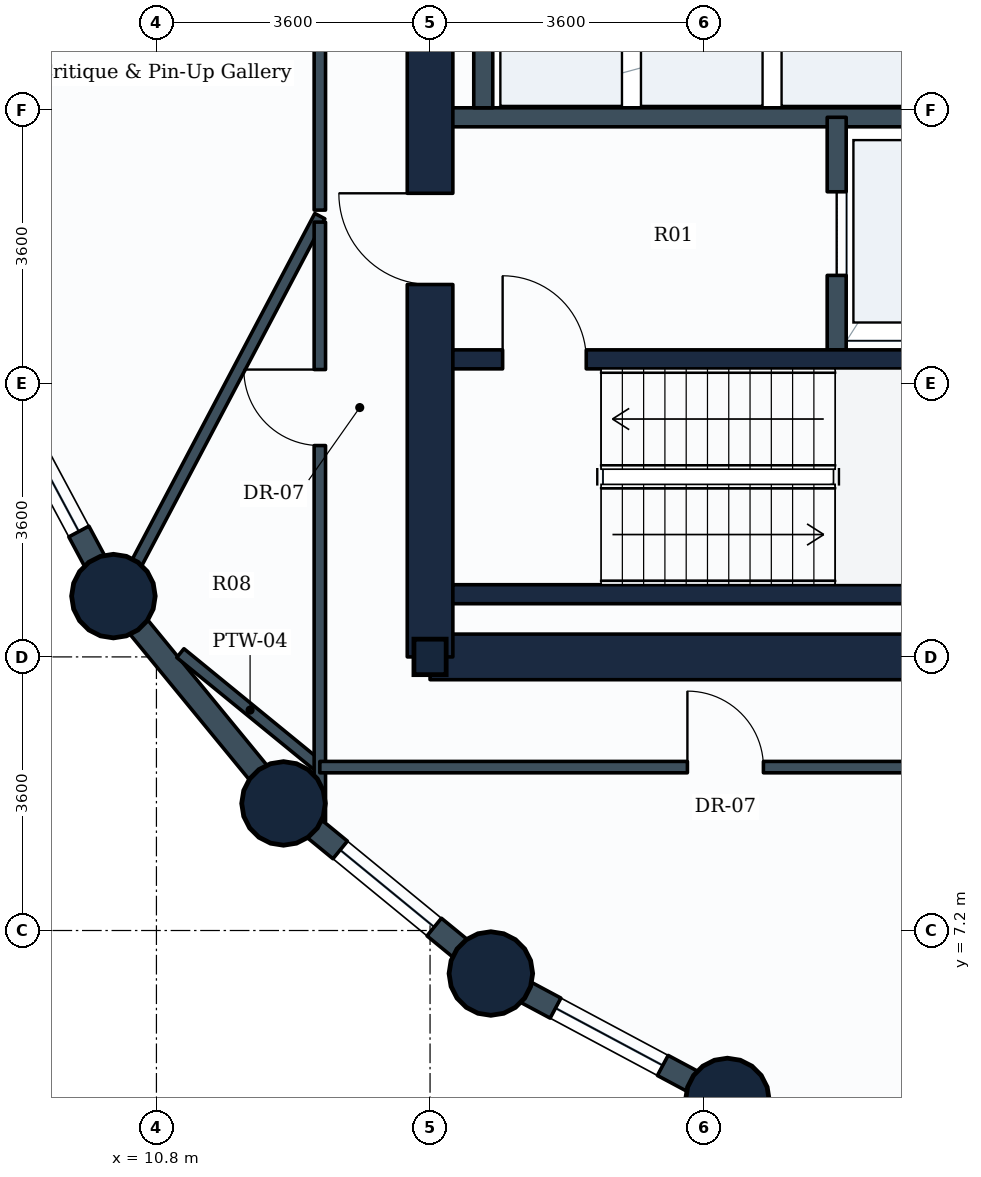
"""IFC4 building model, lengths in metres.
Left out: names, types, materials, properties, quantities, classifications, styles, units other than length and angle.
Written with IfcOpenShell. Run it as: python <this file> out.ifc"""

import sys

from ifc_helpers import new_model, si_unit, direction, frame, frame_2d, origin, origin_2d, place, context, subcontext, project, spatial, rectangle, circle, i_section, extrude, element, fill, save


model = new_model("IFC4")
c1 = context("Model", 3, precision=1e-05, world=origin(), true_north=direction((0.0, 1.0)))
c2 = subcontext(c1, "Body", "Model", "MODEL_VIEW")
j1 = project(units=[si_unit("LENGTHUNIT", "METRE"), si_unit("PLANEANGLEUNIT", "RADIAN")], contexts=[c1])
p1 = place(None, origin())
s1 = spatial("IfcSite", under=j1, at=p1, CompositionType="ELEMENT")
p2 = place(p1, origin())
s2 = spatial("IfcBuilding", under=s1, at=p2, CompositionType="ELEMENT")
p3 = place(p2, frame((0.0, 0.0, 95.7)))
s3 = spatial("IfcBuildingStorey", under=s2, at=p3, CompositionType="ELEMENT", Elevation=95.7)
for number, where, z_axis, x_axis in (
    (1, (10.234, 11.6, 0.0), (0.0, 0.0, 1.0), (1.0, 0.0, 0.0)),
    (2, (12.472, 8.872, 0.0), (0.0, 0.0, 1.0), (1.0, 0.0, 0.0)),
):
    element("IfcColumn", number, at=place(p3, frame(where, z_axis=z_axis, x_axis=x_axis)), inside=s3, PredefinedType="COLUMN", context=c2, shape_type="SweptSolid", body=[
        extrude(circle(Radius=0.55, at=origin_2d()), origin(), (0.0, 0.0, 1.0), 3.9),
    ])
p4 = place(p3, frame((14.4, 10.8, 0.0), z_axis=(0.0, 0.0, 1.0), x_axis=(1.0, 0.0, 0.0)))
e3 = element("IfcColumn", 3, at=p4, inside=s3, PredefinedType="COLUMN", context=c2, shape_type="SweptSolid", body=[
    extrude(i_section(OverallWidth=0.424, OverallDepth=0.467, WebThickness=0.033, FlangeThickness=0.053, FilletRadius=0.015, at=origin_2d()), origin(), (0.0, 0.0, 1.0), 3.9),
])
for number, where, z_axis, x_axis in (
    (4, (15.2, 6.634, 0.0), (0.0, 0.0, 1.0), (1.0, 0.0, 0.0)),
    (5, (18.312, 4.97, 0.0), (0.0, 0.0, 1.0), (1.0, 0.0, 0.0)),
):
    element("IfcColumn", number, at=place(p3, frame(where, z_axis=z_axis, x_axis=x_axis)), inside=s3, PredefinedType="COLUMN", context=c2, shape_type="SweptSolid", body=[
        extrude(circle(Radius=0.55, at=origin_2d()), origin(), (0.0, 0.0, 1.0), 3.9),
    ])
p5 = place(p3, frame((10.234, 11.6, 0.0), z_axis=(0.0, 0.0, 1.0), x_axis=(-0.47151087309, 0.881860247748, 0.0)))
e6 = element("IfcWall", 6, at=p5, inside=s3, PredefinedType="STANDARD", context=c2, shape_type="SweptSolid", body=[
    extrude(rectangle(XDim=3.529, YDim=0.3, at=frame_2d((1.764, 0.0))), origin(), (0.0, 0.0, 1.0), 2.93),
])
p6 = place(p5, frame((0.964, 0.0, 0.85)))
e7 = element("IfcOpeningElement", 7, at=p6, cuts=e6, PredefinedType="OPENING", context=c2, shape_type="SweptSolid", body=[
    extrude(rectangle(XDim=1.6, YDim=1.35, at=frame_2d((0.8, 0.675))), frame((0.0, 0.16, 0.0), z_axis=(0.0, -1.0, 0.0), x_axis=(1.0, 0.0, 0.0)), (0.0, 0.0, 1.0), 0.32),
])
p7 = place(p3, frame((12.472, 8.872, 0.0), z_axis=(0.0, 0.0, 1.0), x_axis=(-0.634258295121, 0.773121216285, 0.0)))
e8 = element("IfcWall", 8, at=p7, inside=s3, PredefinedType="STANDARD", context=c2, shape_type="SweptSolid", body=[
    extrude(rectangle(XDim=3.529, YDim=0.3, at=frame_2d((1.764, 0.0))), origin(), (0.0, 0.0, 1.0), 2.93),
])
p8 = place(p3, frame((15.2, 6.634, 0.0), z_axis=(0.0, 0.0, 1.0), x_axis=(-0.773121216285, 0.634258295121, 0.0)))
e9 = element("IfcWall", 9, at=p8, inside=s3, PredefinedType="STANDARD", context=c2, shape_type="SweptSolid", body=[
    extrude(rectangle(XDim=3.529, YDim=0.3, at=frame_2d((1.764, 0.0))), origin(), (0.0, 0.0, 1.0), 2.93),
])
p9 = place(p8, frame((0.964, 0.0, 0.85)))
e10 = element("IfcOpeningElement", 10, at=p9, cuts=e9, PredefinedType="OPENING", context=c2, shape_type="SweptSolid", body=[
    extrude(rectangle(XDim=1.6, YDim=1.35, at=frame_2d((0.8, 0.675))), frame((0.0, 0.16, 0.0), z_axis=(0.0, -1.0, 0.0), x_axis=(1.0, 0.0, 0.0)), (0.0, 0.0, 1.0), 0.32),
])
p10 = place(p3, frame((18.312, 4.97, 0.0), z_axis=(0.0, 0.0, 1.0), x_axis=(-0.881846862014, 0.471535907389, 0.0)))
e11 = element("IfcWall", 11, at=p10, inside=s3, PredefinedType="STANDARD", context=c2, shape_type="SweptSolid", body=[
    extrude(rectangle(XDim=3.529, YDim=0.3, at=frame_2d((1.765, 0.0))), origin(), (0.0, 0.0, 1.0), 2.93),
])
p11 = place(p10, frame((0.964, 0.0, 0.85)))
e12 = element("IfcOpeningElement", 12, at=p11, cuts=e11, PredefinedType="OPENING", context=c2, shape_type="SweptSolid", body=[
    extrude(rectangle(XDim=1.6, YDim=1.35, at=frame_2d((0.8, 0.675))), frame((0.0, 0.16, 0.0), z_axis=(0.0, -1.0, 0.0), x_axis=(1.0, 0.0, 0.0)), (0.0, 0.0, 1.0), 0.32),
])
p12 = place(p3, frame((21.688, 3.946, 0.0), z_axis=(0.0, 0.0, 1.0), x_axis=(-0.956953367403, 0.290241714123, 0.0)))
e13 = element("IfcWall", 13, at=p12, inside=s3, PredefinedType="STANDARD", context=c2, shape_type="SweptSolid", body=[
    extrude(rectangle(XDim=3.528, YDim=0.3, at=frame_2d((1.764, 0.0))), origin(), (0.0, 0.0, 1.0), 2.93),
])
p13 = place(p12, frame((0.964, 0.0, 0.85)))
e14 = element("IfcOpeningElement", 14, at=p13, cuts=e13, PredefinedType="OPENING", context=c2, shape_type="SweptSolid", body=[
    extrude(rectangle(XDim=1.6, YDim=1.35, at=frame_2d((0.8, 0.675))), frame((0.0, 0.16, 0.0), z_axis=(0.0, -1.0, 0.0), x_axis=(1.0, 0.0, 0.0)), (0.0, 0.0, 1.0), 0.32),
])
p14 = place(p3, frame((14.4, 10.8, 0.0), z_axis=(0.0, 0.0, 1.0), x_axis=(1.0, 0.0, 0.0)))
e15 = element("IfcWall", 15, at=p14, inside=s3, PredefinedType="SHEAR", context=c2, shape_type="SweptSolid", body=[
    extrude(rectangle(XDim=18.0, YDim=0.6, at=frame_2d((9.0, 0.0))), origin(), (0.0, 0.0, 1.0), 3.65),
])
p15 = place(p3, frame((14.4, 10.8, 0.0), z_axis=(0.0, 0.0, 1.0), x_axis=(0.0, 1.0, 0.0)))
e16 = element("IfcWall", 16, at=p15, inside=s3, PredefinedType="SHEAR", context=c2, shape_type="SweptSolid", body=[
    extrude(rectangle(XDim=14.4, YDim=0.6, at=frame_2d((7.2, 0.0))), origin(), (0.0, 0.0, 1.0), 3.65),
])
p16 = place(p15, frame((11.05, 0.0, 0.0)))
e17 = element("IfcOpeningElement", 17, at=p16, cuts=e16, PredefinedType="OPENING", context=c2, shape_type="SweptSolid", body=[
    extrude(rectangle(XDim=1.1, YDim=2.1, at=frame_2d((0.55, 1.05))), frame((0.0, 0.31, 0.0), z_axis=(0.0, -1.0, 0.0), x_axis=(1.0, 0.0, 0.0)), (0.0, 0.0, 1.0), 0.62),
])
p17 = place(p15, frame((4.9, 0.0, 0.0)))
e18 = element("IfcOpeningElement", 18, at=p17, cuts=e16, PredefinedType="OPENING", context=c2, shape_type="SweptSolid", body=[
    extrude(rectangle(XDim=1.2, YDim=2.1, at=frame_2d((0.6, 1.05))), frame((0.0, 0.31, 0.0), z_axis=(0.0, -1.0, 0.0), x_axis=(1.0, 0.0, 0.0)), (0.0, 0.0, 1.0), 0.62),
])
p18 = place(p3, frame((14.7, 11.625, 0.0), z_axis=(0.0, 0.0, 1.0), x_axis=(1.0, 0.0, 0.0)))
e19 = element("IfcWall", 19, at=p18, inside=s3, PredefinedType="SHEAR", context=c2, shape_type="SweptSolid", body=[
    extrude(rectangle(XDim=8.65, YDim=0.25, at=frame_2d((4.325, 0.0))), origin(), (0.0, 0.0, 1.0), 3.65),
])
p19 = place(p3, frame((14.7, 14.715, 0.0), z_axis=(0.0, 0.0, 1.0), x_axis=(1.0, 0.0, 0.0)))
e20 = element("IfcWall", 20, at=p19, inside=s3, PredefinedType="SHEAR", context=c2, shape_type="SweptSolid", body=[
    extrude(rectangle(XDim=8.65, YDim=0.25, at=frame_2d((4.325, 0.0))), origin(), (0.0, 0.0, 1.0), 3.65),
])
p20 = place(p19, frame((0.655, 0.0, 0.0)))
e21 = element("IfcOpeningElement", 21, at=p20, cuts=e20, PredefinedType="OPENING", context=c2, shape_type="SweptSolid", body=[
    extrude(rectangle(XDim=1.1, YDim=2.1, at=frame_2d((0.55, 1.05))), frame((0.0, 0.135, 0.0), z_axis=(0.0, -1.0, 0.0), x_axis=(1.0, 0.0, 0.0)), (0.0, 0.0, 1.0), 0.27),
])
p21 = place(p3, frame((14.65, 17.9, 0.0), z_axis=(0.0, 0.0, 1.0), x_axis=(1.0, 0.0, 0.0)))
e22 = element("IfcWall", 22, at=p21, inside=s3, PredefinedType="PARTITIONING", context=c2, shape_type="SweptSolid", body=[
    extrude(rectangle(XDim=7.15, YDim=0.25, at=frame_2d((3.575, 0.0))), origin(), (0.0, 0.0, 1.0), 3.635),
])
p22 = place(p3, frame((19.75, 14.84, 0.0), z_axis=(0.0, 0.0, 1.0), x_axis=(0.0, 1.0, 0.0)))
e23 = element("IfcWall", 23, at=p22, inside=s3, PredefinedType="PARTITIONING", context=c2, shape_type="SweptSolid", body=[
    extrude(rectangle(XDim=3.06, YDim=0.25, at=frame_2d((1.53, 0.0))), origin(), (0.0, 0.0, 1.0), 3.635),
])
p23 = place(p22, frame((0.98, 0.0, 0.0)))
e24 = element("IfcOpeningElement", 24, at=p23, cuts=e23, PredefinedType="OPENING", context=c2, shape_type="SweptSolid", body=[
    extrude(rectangle(XDim=1.1, YDim=2.1, at=frame_2d((0.55, 1.05))), frame((0.0, 0.135, 0.0), z_axis=(0.0, -1.0, 0.0), x_axis=(1.0, 0.0, 0.0)), (0.0, 0.0, 1.0), 0.27),
])
p24 = place(p3, frame((15.1, 18.025, 0.0), z_axis=(0.0, 0.0, 1.0), x_axis=(0.0, 1.0, 0.0)))
e25 = element("IfcWall", 25, at=p24, inside=s3, PredefinedType="PARTITIONING", context=c2, shape_type="SweptSolid", body=[
    extrude(rectangle(XDim=1.975, YDim=0.25, at=frame_2d((0.988, 0.0))), origin(), (0.0, 0.0, 1.0), 3.635),
])
p25 = place(p3, frame((12.95, 9.35, 0.0), z_axis=(0.0, 0.0, 1.0), x_axis=(-0.774315108081, 0.632800216022, 0.0)))
e26 = element("IfcWall", 26, at=p25, inside=s3, PredefinedType="PARTITIONING", context=c2, shape_type="SweptSolid", body=[
    extrude(rectangle(XDim=2.37, YDim=0.15, at=frame_2d((1.185, 0.0))), origin(), (0.0, 0.0, 1.0), 2.93),
])
p26 = place(p3, frame((12.95, 16.6, 0.0), z_axis=(0.0, 0.0, 1.0), x_axis=(-0.466710911312, -0.884409930554, 0.0)))
e27 = element("IfcWall", 27, at=p26, inside=s3, PredefinedType="PARTITIONING", context=c2, shape_type="SweptSolid", body=[
    extrude(rectangle(XDim=5.559, YDim=0.15, at=frame_2d((2.78, 0.0))), origin(), (0.0, 0.0, 1.0), 2.93),
])
p27 = place(p3, frame((12.95, 16.679, 0.0), z_axis=(0.0, 0.0, 1.0), x_axis=(0.0, 1.0, 0.0)))
e28 = element("IfcWall", 28, at=p27, inside=s3, PredefinedType="PARTITIONING", context=c2, shape_type="SweptSolid", body=[
    extrude(rectangle(XDim=8.442, YDim=0.15, at=frame_2d((4.221, 0.0))), origin(), (0.0, 0.0, 1.0), 3.19),
])
p28 = place(p27, frame((3.721, 0.0, 0.0)))
e29 = element("IfcOpeningElement", 29, at=p28, cuts=e28, PredefinedType="OPENING", context=c2, shape_type="SweptSolid", body=[
    extrude(rectangle(XDim=1.0, YDim=2.1, at=frame_2d((0.5, 1.05))), frame((0.0, 0.085, 0.0), z_axis=(0.0, -1.0, 0.0), x_axis=(1.0, 0.0, 0.0)), (0.0, 0.0, 1.0), 0.17),
])
p29 = place(p3, frame((12.95, 8.634, 0.0), z_axis=(0.0, 0.0, 1.0), x_axis=(0.0, 1.0, 0.0)))
e30 = element("IfcWall", 30, at=p29, inside=s3, PredefinedType="PARTITIONING", context=c2, shape_type="SweptSolid", body=[
    extrude(rectangle(XDim=7.887, YDim=0.15, at=frame_2d((3.944, 0.0))), origin(), (0.0, 0.0, 1.0), 2.93),
])
p30 = place(p29, frame((4.947, 0.0, 0.0)))
e31 = element("IfcOpeningElement", 31, at=p30, cuts=e30, PredefinedType="OPENING", context=c2, shape_type="SweptSolid", body=[
    extrude(rectangle(XDim=1.0, YDim=2.1, at=frame_2d((0.5, 1.05))), frame((0.0, 0.085, 0.0), z_axis=(0.0, -1.0, 0.0), x_axis=(1.0, 0.0, 0.0)), (0.0, 0.0, 1.0), 0.17),
])
p31 = place(p3, frame((12.95, 9.35, 0.0), z_axis=(0.0, 0.0, 1.0), x_axis=(1.0, 0.0, 0.0)))
e32 = element("IfcWall", 32, at=p31, inside=s3, PredefinedType="PARTITIONING", context=c2, shape_type="SweptSolid", body=[
    extrude(rectangle(XDim=15.771, YDim=0.15, at=frame_2d((7.885, 0.0))), origin(), (0.0, 0.0, 1.0), 3.18),
])
p32 = place(p31, frame((4.836, 0.0, 0.0)))
e33 = element("IfcOpeningElement", 33, at=p32, cuts=e32, PredefinedType="OPENING", context=c2, shape_type="SweptSolid", body=[
    extrude(rectangle(XDim=1.0, YDim=2.1, at=frame_2d((0.5, 1.05))), frame((0.0, 0.085, 0.0), z_axis=(0.0, -1.0, 0.0), x_axis=(1.0, 0.0, 0.0)), (0.0, 0.0, 1.0), 0.17),
])
p33 = place(p6, origin())
e34 = element("IfcWindow", 34, at=p33, inside=s3, PartitioningType="SINGLE_PANEL", PredefinedType="WINDOW", context=c2, shape_type="SweptSolid", body=[
    extrude(rectangle(XDim=1.6, YDim=1.35, at=frame_2d((0.8, 0.675))), frame((0.0, 0.03, 0.0), z_axis=(0.0, -1.0, 0.0), x_axis=(1.0, 0.0, 0.0)), (0.0, 0.0, 1.0), 0.06),
])
fill(e7, e34)
p34 = place(p9, origin())
e35 = element("IfcWindow", 35, at=p34, inside=s3, PartitioningType="SINGLE_PANEL", PredefinedType="WINDOW", context=c2, shape_type="SweptSolid", body=[
    extrude(rectangle(XDim=1.6, YDim=1.35, at=frame_2d((0.8, 0.675))), frame((0.0, 0.03, 0.0), z_axis=(0.0, -1.0, 0.0), x_axis=(1.0, 0.0, 0.0)), (0.0, 0.0, 1.0), 0.06),
])
fill(e10, e35)
p35 = place(p11, origin())
e36 = element("IfcWindow", 36, at=p35, inside=s3, PartitioningType="SINGLE_PANEL", PredefinedType="WINDOW", context=c2, shape_type="SweptSolid", body=[
    extrude(rectangle(XDim=1.6, YDim=1.35, at=frame_2d((0.8, 0.675))), frame((0.0, 0.03, 0.0), z_axis=(0.0, -1.0, 0.0), x_axis=(1.0, 0.0, 0.0)), (0.0, 0.0, 1.0), 0.06),
])
fill(e12, e36)
p36 = place(p20, origin())
e37 = element("IfcDoor", 37, at=p36, inside=s3, OperationType="SINGLE_SWING_LEFT", PredefinedType="DOOR", context=c2, shape_type="SweptSolid", body=[
    extrude(rectangle(XDim=1.1, YDim=2.1, at=frame_2d((0.55, 1.05))), frame((0.0, 0.025, 0.0), z_axis=(0.0, -1.0, 0.0), x_axis=(1.0, 0.0, 0.0)), (0.0, 0.0, 1.0), 0.05),
])
fill(e21, e37)
p37 = place(p23, origin())
e38 = element("IfcDoor", 38, at=p37, inside=s3, OperationType="SLIDING_TO_LEFT", PredefinedType="DOOR", context=c2, shape_type="SweptSolid", body=[
    extrude(rectangle(XDim=1.1, YDim=2.1, at=frame_2d((0.55, 1.05))), frame((0.0, 0.025, 0.0), z_axis=(0.0, -1.0, 0.0), x_axis=(1.0, 0.0, 0.0)), (0.0, 0.0, 1.0), 0.05),
])
fill(e24, e38)
p38 = place(p17, origin())
e39 = element("IfcDoor", 39, at=p38, inside=s3, OperationType="SINGLE_SWING_RIGHT", PredefinedType="DOOR", context=c2, shape_type="SweptSolid", body=[
    extrude(rectangle(XDim=1.2, YDim=2.1, at=frame_2d((0.6, 1.05))), frame((0.0, 0.025, 0.0), z_axis=(0.0, -1.0, 0.0), x_axis=(1.0, 0.0, 0.0)), (0.0, 0.0, 1.0), 0.05),
])
fill(e18, e39)
p39 = place(p30, origin())
e40 = element("IfcDoor", 40, at=p39, inside=s3, OperationType="SINGLE_SWING_RIGHT", PredefinedType="DOOR", context=c2, shape_type="SweptSolid", body=[
    extrude(rectangle(XDim=1.0, YDim=2.1, at=frame_2d((0.5, 1.05))), frame((0.0, 0.025, 0.0), z_axis=(0.0, -1.0, 0.0), x_axis=(1.0, 0.0, 0.0)), (0.0, 0.0, 1.0), 0.05),
])
fill(e31, e40)
p40 = place(p32, origin())
e41 = element("IfcDoor", 41, at=p40, inside=s3, OperationType="SINGLE_SWING_LEFT", PredefinedType="DOOR", context=c2, shape_type="SweptSolid", body=[
    extrude(rectangle(XDim=1.0, YDim=2.1, at=frame_2d((0.5, 1.05))), frame((0.0, 0.025, 0.0), z_axis=(0.0, -1.0, 0.0), x_axis=(1.0, 0.0, 0.0)), (0.0, 0.0, 1.0), 0.05),
])
fill(e33, e41)
save(model, sys.argv[1])
